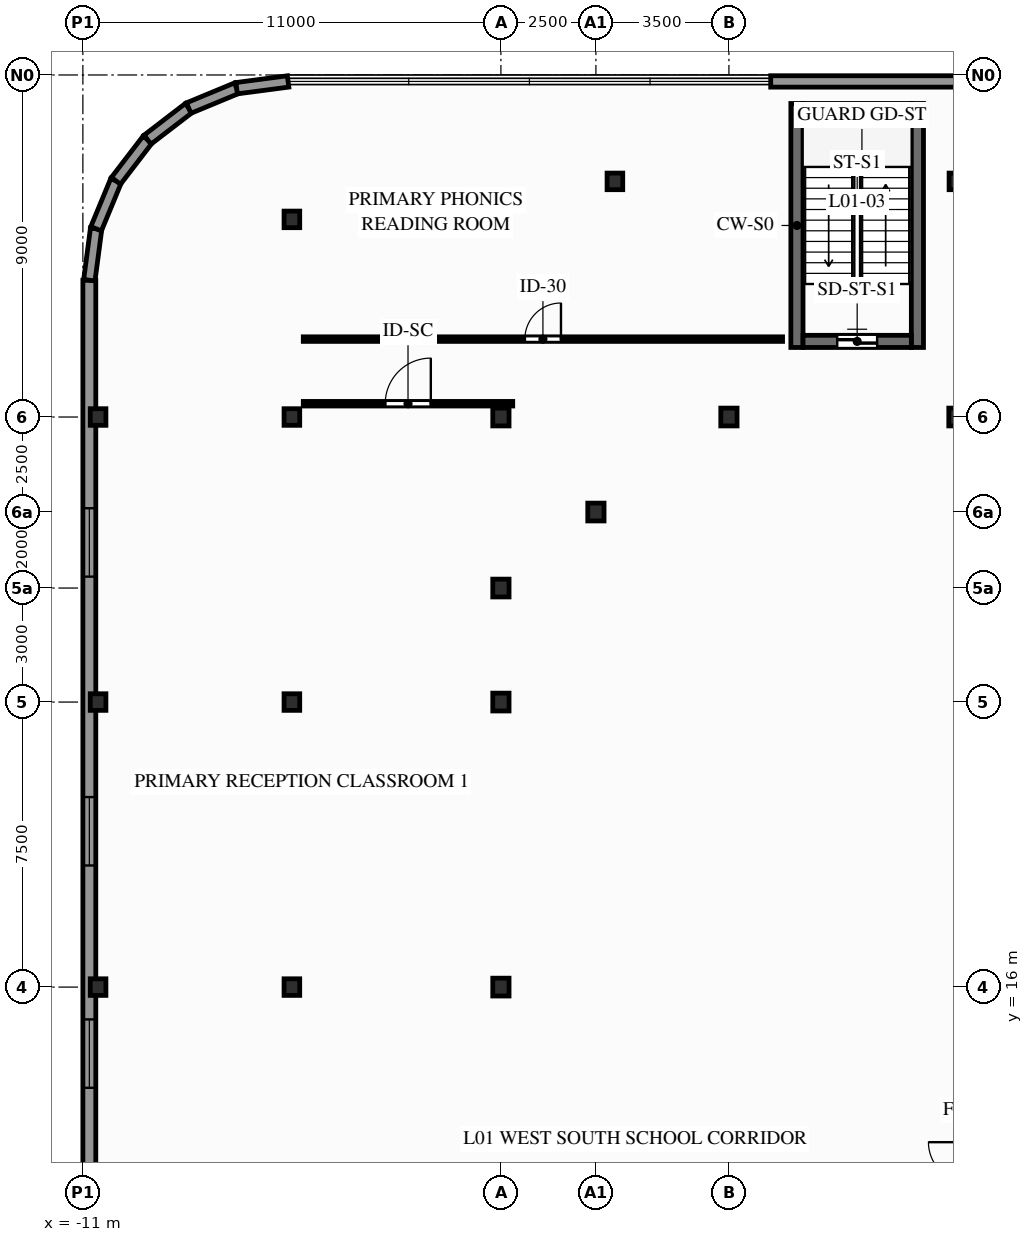
"""IFC4 building model, lengths in metres.
Left out: names, types, materials, properties, quantities, classifications, styles, units other than length and angle.
Written with IfcOpenShell. Run it as: python <this file> out.ifc"""

import sys

from ifc_helpers import new_model, si_unit, direction, frame, frame_2d, origin, origin_2d, place, context, subcontext, project, spatial, rectangle, i_section, extrude, element, fill, save


model = new_model("IFC4")
c1 = context("Model", 3, precision=1e-05, world=origin(), true_north=direction((0.0, 1.0)))
c2 = subcontext(c1, "Body", "Model", "MODEL_VIEW")
j1 = project(units=[si_unit("LENGTHUNIT", "METRE"), si_unit("PLANEANGLEUNIT", "RADIAN")], contexts=[c1])
p1 = place(None, origin())
s1 = spatial("IfcSite", under=j1, at=p1, CompositionType="ELEMENT")
p2 = place(p1, origin())
s2 = spatial("IfcBuilding", under=s1, at=p2, CompositionType="ELEMENT")
p3 = place(p2, frame((0.0, 0.0, 4.5)))
s3 = spatial("IfcBuildingStorey", under=s2, at=p3, CompositionType="ELEMENT", Elevation=4.5)
for number, where, z_axis, x_axis in (
    (1, (-10.6, 16.0, 0.0), (0.0, 0.0, 1.0), (1.0, 0.0, 0.0)),
    (2, (-10.6, 23.5, 0.0), (0.0, 0.0, 1.0), (1.0, 0.0, 0.0)),
    (3, (-10.6, 31.0, 0.0), (0.0, 0.0, 1.0), (1.0, 0.0, 0.0)),
    (4, (-5.5, 16.0, 0.0), (0.0, 0.0, 1.0), (1.0, 0.0, 0.0)),
    (5, (-5.5, 23.5, 0.0), (0.0, 0.0, 1.0), (1.0, 0.0, 0.0)),
    (6, (-5.5, 31.0, 0.0), (0.0, 0.0, 1.0), (1.0, 0.0, 0.0)),
    (7, (-5.5, 36.2, 0.0), (0.0, 0.0, 1.0), (1.0, 0.0, 0.0)),
):
    element("IfcColumn", number, at=place(p3, frame(where, z_axis=z_axis, x_axis=x_axis)), inside=s3, PredefinedType="COLUMN", context=c2, shape_type="SweptSolid", body=[
        extrude(i_section(OverallWidth=0.412, OverallDepth=0.437, WebThickness=0.036, FlangeThickness=0.058, FilletRadius=0.015, at=origin_2d()), origin(), (0.0, 0.0, 1.0), 4.5),
    ])
for number, where, z_axis, x_axis in (
    (8, (0.0, 16.0, 0.0), (0.0, 0.0, 1.0), (1.0, 0.0, 0.0)),
    (9, (0.0, 23.5, 0.0), (0.0, 0.0, 1.0), (1.0, 0.0, 0.0)),
    (10, (0.0, 26.5, 0.0), (0.0, 0.0, 1.0), (1.0, 0.0, 0.0)),
    (11, (0.0, 31.0, 0.0), (0.0, 0.0, 1.0), (1.0, 0.0, 0.0)),
    (12, (2.5, 28.5, 0.0), (0.0, 0.0, 1.0), (1.0, 0.0, 0.0)),
):
    element("IfcColumn", number, at=place(p3, frame(where, z_axis=z_axis, x_axis=x_axis)), inside=s3, PredefinedType="COLUMN", context=c2, shape_type="SweptSolid", body=[
        extrude(i_section(OverallWidth=0.428, OverallDepth=0.469, WebThickness=0.078, FlangeThickness=0.125, FilletRadius=0.015, at=origin_2d()), origin(), (0.0, 0.0, 1.0), 4.5),
    ])
p4 = place(p3, frame((3.0, 37.2, 0.0), z_axis=(0.0, 0.0, 1.0), x_axis=(1.0, 0.0, 0.0)))
e13 = element("IfcColumn", 13, at=p4, inside=s3, PredefinedType="COLUMN", context=c2, shape_type="SweptSolid", body=[
    extrude(i_section(OverallWidth=0.412, OverallDepth=0.437, WebThickness=0.036, FlangeThickness=0.058, FilletRadius=0.015, at=origin_2d()), origin(), (0.0, 0.0, 1.0), 4.5),
])
for number, where, z_axis, x_axis in (
    (14, (6.0, 31.0, 0.0), (0.0, 0.0, 1.0), (1.0, 0.0, 0.0)),
    (15, (12.0, 31.0, 0.0), (0.0, 0.0, 1.0), (1.0, 0.0, 0.0)),
):
    element("IfcColumn", number, at=place(p3, frame(where, z_axis=z_axis, x_axis=x_axis)), inside=s3, PredefinedType="COLUMN", context=c2, shape_type="SweptSolid", body=[
        extrude(i_section(OverallWidth=0.428, OverallDepth=0.469, WebThickness=0.078, FlangeThickness=0.125, FilletRadius=0.015, at=origin_2d()), origin(), (0.0, 0.0, 1.0), 4.5),
    ])
p5 = place(p3, frame((12.0, 37.2, 0.0), z_axis=(0.0, 0.0, 1.0), x_axis=(1.0, 0.0, 0.0)))
e16 = element("IfcColumn", 16, at=p5, inside=s3, PredefinedType="COLUMN", context=c2, shape_type="SweptSolid", body=[
    extrude(i_section(OverallWidth=0.412, OverallDepth=0.437, WebThickness=0.036, FlangeThickness=0.058, FilletRadius=0.015, at=origin_2d()), origin(), (0.0, 0.0, 1.0), 4.5),
])
p6 = place(p3, frame((-10.83, 34.6, 0.0), z_axis=(0.0, 0.0, 1.0), x_axis=(0.0, -1.0, 0.0)))
e17 = element("IfcWall", 17, at=p6, inside=s3, PredefinedType="STANDARD", context=c2, shape_type="SweptSolid", body=[
    extrude(rectangle(XDim=36.43, YDim=0.34, at=frame_2d((18.215, 0.0))), origin(), (0.0, 0.0, 1.0), 3.583),
])
p7 = place(p6, frame((28.3, 0.0, 0.9)))
e18 = element("IfcOpeningElement", 18, at=p7, cuts=e17, PredefinedType="OPENING", context=c2, shape_type="SweptSolid", body=[
    extrude(rectangle(XDim=1.8, YDim=1.95, at=frame_2d((0.9, 0.975))), frame((0.0, 0.18, 0.0), z_axis=(0.0, -1.0, 0.0), x_axis=(1.0, 0.0, 0.0)), (0.0, 0.0, 1.0), 0.36),
])
p8 = place(p6, frame((19.45, 0.0, 0.9)))
e19 = element("IfcOpeningElement", 19, at=p8, cuts=e17, PredefinedType="OPENING", context=c2, shape_type="SweptSolid", body=[
    extrude(rectangle(XDim=1.8, YDim=1.95, at=frame_2d((0.9, 0.975))), frame((0.0, 0.18, 0.0), z_axis=(0.0, -1.0, 0.0), x_axis=(1.0, 0.0, 0.0)), (0.0, 0.0, 1.0), 0.36),
])
p9 = place(p6, frame((13.6, 0.0, 0.9)))
e20 = element("IfcOpeningElement", 20, at=p9, cuts=e17, PredefinedType="OPENING", context=c2, shape_type="SweptSolid", body=[
    extrude(rectangle(XDim=1.8, YDim=1.95, at=frame_2d((0.9, 0.975))), frame((0.0, 0.18, 0.0), z_axis=(0.0, -1.0, 0.0), x_axis=(1.0, 0.0, 0.0)), (0.0, 0.0, 1.0), 0.36),
])
p10 = place(p6, frame((6.0, 0.0, 0.9)))
e21 = element("IfcOpeningElement", 21, at=p10, cuts=e17, PredefinedType="OPENING", context=c2, shape_type="SweptSolid", body=[
    extrude(rectangle(XDim=1.8, YDim=1.95, at=frame_2d((0.9, 0.975))), frame((0.0, 0.18, 0.0), z_axis=(0.0, -1.0, 0.0), x_axis=(1.0, 0.0, 0.0)), (0.0, 0.0, 1.0), 0.36),
])
p11 = place(p3, frame((-10.83, 34.6, 0.0), z_axis=(0.0, 0.0, 1.0), x_axis=(0.13054703207, 0.991442117533, 0.0)))
e22 = element("IfcWall", 22, at=p11, inside=s3, PredefinedType="STANDARD", context=c2, shape_type="SweptSolid", body=[
    extrude(rectangle(XDim=1.365, YDim=0.3, at=frame_2d((0.683, 0.0))), origin(), (0.0, 0.0, 1.0), 4.22),
])
p12 = place(p3, frame((-10.652, 35.954, 0.0), z_axis=(0.0, 0.0, 1.0), x_axis=(0.382646577594, 0.923894797396, 0.0)))
e23 = element("IfcWall", 23, at=p12, inside=s3, PredefinedType="STANDARD", context=c2, shape_type="SweptSolid", body=[
    extrude(rectangle(XDim=1.365, YDim=0.3, at=frame_2d((0.683, 0.0))), origin(), (0.0, 0.0, 1.0), 4.22),
])
for number, where, z_axis, x_axis in (
    (24, (-10.129, 37.215, 0.0), (0.0, 0.0, 1.0), (0.609, 0.793, 0.0)),
    (25, (-9.298, 38.298, 0.0), (0.0, 0.0, 1.0), (0.793, 0.609, 0.0)),
):
    element("IfcWall", number, at=place(p3, frame(where, z_axis=z_axis, x_axis=x_axis)), inside=s3, PredefinedType="STANDARD", context=c2, shape_type="SweptSolid", body=[
        extrude(rectangle(XDim=1.365, YDim=0.3, at=frame_2d((0.683, 0.0))), origin(), (0.0, 0.0, 1.0), 4.22),
    ])
p13 = place(p3, frame((-8.215, 39.129, 0.0), z_axis=(0.0, 0.0, 1.0), x_axis=(0.923894797396, 0.382646577594, 0.0)))
e26 = element("IfcWall", 26, at=p13, inside=s3, PredefinedType="STANDARD", context=c2, shape_type="SweptSolid", body=[
    extrude(rectangle(XDim=1.365, YDim=0.3, at=frame_2d((0.683, 0.0))), origin(), (0.0, 0.0, 1.0), 4.22),
])
p14 = place(p3, frame((-6.954, 39.652, 0.0), z_axis=(0.0, 0.0, 1.0), x_axis=(0.991442117533, 0.13054703207, 0.0)))
e27 = element("IfcWall", 27, at=p14, inside=s3, PredefinedType="STANDARD", context=c2, shape_type="SweptSolid", body=[
    extrude(rectangle(XDim=1.365, YDim=0.3, at=frame_2d((0.683, 0.0))), origin(), (0.0, 0.0, 1.0), 4.22),
])
p15 = place(p3, frame((7.1, 39.83, 0.0), z_axis=(0.0, 0.0, 1.0), x_axis=(1.0, 0.0, 0.0)))
e28 = element("IfcWall", 28, at=p15, inside=s3, PredefinedType="STANDARD", context=c2, shape_type="SweptSolid", body=[
    extrude(rectangle(XDim=11.55, YDim=0.3, at=frame_2d((5.775, 0.0))), origin(), (0.0, 0.0, 1.0), 4.22),
])
for number, where, z_axis, x_axis in (
    (29, (7.79, 32.83, 0.0), (0.0, 0.0, 1.0), (0.0, 1.0, 0.0)),
    (30, (10.96, 32.83, 0.0), (0.0, 0.0, 1.0), (0.0, 1.0, 0.0)),
):
    element("IfcWall", number, at=place(p3, frame(where, z_axis=z_axis, x_axis=x_axis)), inside=s3, PredefinedType="SHEAR", context=c2, shape_type="SweptSolid", body=[
        extrude(rectangle(XDim=6.42, YDim=0.32, at=frame_2d((3.21, 0.0))), origin(), (0.0, 0.0, 1.0), 4.22),
    ])
p16 = place(p3, frame((7.95, 32.99, 0.0), z_axis=(0.0, 0.0, 1.0), x_axis=(1.0, 0.0, 0.0)))
e31 = element("IfcWall", 31, at=p16, inside=s3, PredefinedType="SHEAR", context=c2, shape_type="SweptSolid", body=[
    extrude(rectangle(XDim=2.85, YDim=0.32, at=frame_2d((1.425, 0.0))), origin(), (0.0, 0.0, 1.0), 4.22),
])
p17 = place(p16, frame((0.9, 0.0, 0.0)))
e32 = element("IfcOpeningElement", 32, at=p17, cuts=e31, PredefinedType="OPENING", context=c2, shape_type="SweptSolid", body=[
    extrude(rectangle(XDim=1.05, YDim=2.06, at=frame_2d((0.525, 1.03))), frame((0.0, 0.17, 0.0), z_axis=(0.0, -1.0, 0.0), x_axis=(1.0, 0.0, 0.0)), (0.0, 0.0, 1.0), 0.34),
])
p18 = place(p3, frame((10.8, 39.09, 0.0), z_axis=(0.0, 0.0, 1.0), x_axis=(-1.0, 0.0, 0.0)))
e33 = element("IfcWall", 33, at=p18, inside=s3, PredefinedType="SHEAR", context=c2, shape_type="SweptSolid", body=[
    extrude(rectangle(XDim=2.85, YDim=0.32, at=frame_2d((1.425, 0.0))), origin(), (0.0, 0.0, 1.0), 4.22),
])
p19 = place(p3, frame((-5.2, 31.35, 0.0), z_axis=(0.0, 0.0, 1.0), x_axis=(1.0, 0.0, 0.0)))
e34 = element("IfcWall", 34, at=p19, inside=s3, PredefinedType="PARTITIONING", context=c2, shape_type="SweptSolid", body=[
    extrude(rectangle(XDim=5.511, YDim=0.12, at=frame_2d((2.756, 0.0))), origin(), (0.0, 0.0, 1.0), 4.22),
])
p20 = place(p19, frame((2.156, 0.0, 0.0)))
e35 = element("IfcOpeningElement", 35, at=p20, cuts=e34, PredefinedType="OPENING", context=c2, shape_type="SweptSolid", body=[
    extrude(rectangle(XDim=1.2, YDim=2.08, at=frame_2d((0.6, 1.04))), frame((0.0, 0.07, 0.0), z_axis=(0.0, -1.0, 0.0), x_axis=(1.0, 0.0, 0.0)), (0.0, 0.0, 1.0), 0.14),
])
p21 = place(p3, frame((-5.2, 33.05, 0.0), z_axis=(0.0, 0.0, 1.0), x_axis=(1.0, 0.0, 0.0)))
e36 = element("IfcWall", 36, at=p21, inside=s3, PredefinedType="PARTITIONING", context=c2, shape_type="SweptSolid", body=[
    extrude(rectangle(XDim=12.611, YDim=0.12, at=frame_2d((6.306, 0.0))), origin(), (0.0, 0.0, 1.0), 4.22),
])
p22 = place(p21, frame((5.831, 0.0, 0.0)))
e37 = element("IfcOpeningElement", 37, at=p22, cuts=e36, PredefinedType="OPENING", context=c2, shape_type="SweptSolid", body=[
    extrude(rectangle(XDim=0.95, YDim=2.05, at=frame_2d((0.475, 1.025))), frame((0.0, 0.07, 0.0), z_axis=(0.0, -1.0, 0.0), x_axis=(1.0, 0.0, 0.0)), (0.0, 0.0, 1.0), 0.14),
])
p23 = place(p8, origin())
e38 = element("IfcWindow", 38, at=p23, inside=s3, PartitioningType="SINGLE_PANEL", PredefinedType="WINDOW", context=c2, shape_type="SweptSolid", body=[
    extrude(rectangle(XDim=1.8, YDim=1.95, at=frame_2d((0.9, 0.975))), frame((0.0, 0.03, 0.0), z_axis=(0.0, -1.0, 0.0), x_axis=(1.0, 0.0, 0.0)), (0.0, 0.0, 1.0), 0.06),
])
fill(e19, e38)
p24 = place(p9, origin())
e39 = element("IfcWindow", 39, at=p24, inside=s3, PartitioningType="SINGLE_PANEL", PredefinedType="WINDOW", context=c2, shape_type="SweptSolid", body=[
    extrude(rectangle(XDim=1.8, YDim=1.95, at=frame_2d((0.9, 0.975))), frame((0.0, 0.03, 0.0), z_axis=(0.0, -1.0, 0.0), x_axis=(1.0, 0.0, 0.0)), (0.0, 0.0, 1.0), 0.06),
])
fill(e20, e39)
p25 = place(p10, origin())
e40 = element("IfcWindow", 40, at=p25, inside=s3, PartitioningType="SINGLE_PANEL", PredefinedType="WINDOW", context=c2, shape_type="SweptSolid", body=[
    extrude(rectangle(XDim=1.8, YDim=1.95, at=frame_2d((0.9, 0.975))), frame((0.0, 0.03, 0.0), z_axis=(0.0, -1.0, 0.0), x_axis=(1.0, 0.0, 0.0)), (0.0, 0.0, 1.0), 0.06),
])
fill(e21, e40)
p26 = place(p17, origin())
e41 = element("IfcDoor", 41, at=p26, inside=s3, OperationType="SINGLE_SWING_RIGHT", PredefinedType="DOOR", context=c2, shape_type="SweptSolid", body=[
    extrude(rectangle(XDim=1.05, YDim=2.06, at=frame_2d((0.525, 1.03))), frame((0.0, 0.025, 0.0), z_axis=(0.0, -1.0, 0.0), x_axis=(1.0, 0.0, 0.0)), (0.0, 0.0, 1.0), 0.05),
])
fill(e32, e41)
p27 = place(p20, origin())
e42 = element("IfcDoor", 42, at=p27, inside=s3, OperationType="SINGLE_SWING_RIGHT", PredefinedType="DOOR", context=c2, shape_type="SweptSolid", body=[
    extrude(rectangle(XDim=1.2, YDim=2.08, at=frame_2d((0.6, 1.04))), frame((0.0, 0.025, 0.0), z_axis=(0.0, -1.0, 0.0), x_axis=(1.0, 0.0, 0.0)), (0.0, 0.0, 1.0), 0.05),
])
fill(e35, e42)
p28 = place(p22, origin())
e43 = element("IfcDoor", 43, at=p28, inside=s3, OperationType="SINGLE_SWING_RIGHT", PredefinedType="DOOR", context=c2, shape_type="SweptSolid", body=[
    extrude(rectangle(XDim=0.95, YDim=2.05, at=frame_2d((0.475, 1.025))), frame((0.0, 0.025, 0.0), z_axis=(0.0, -1.0, 0.0), x_axis=(1.0, 0.0, 0.0)), (0.0, 0.0, 1.0), 0.05),
])
fill(e37, e43)
save(model, sys.argv[1])
